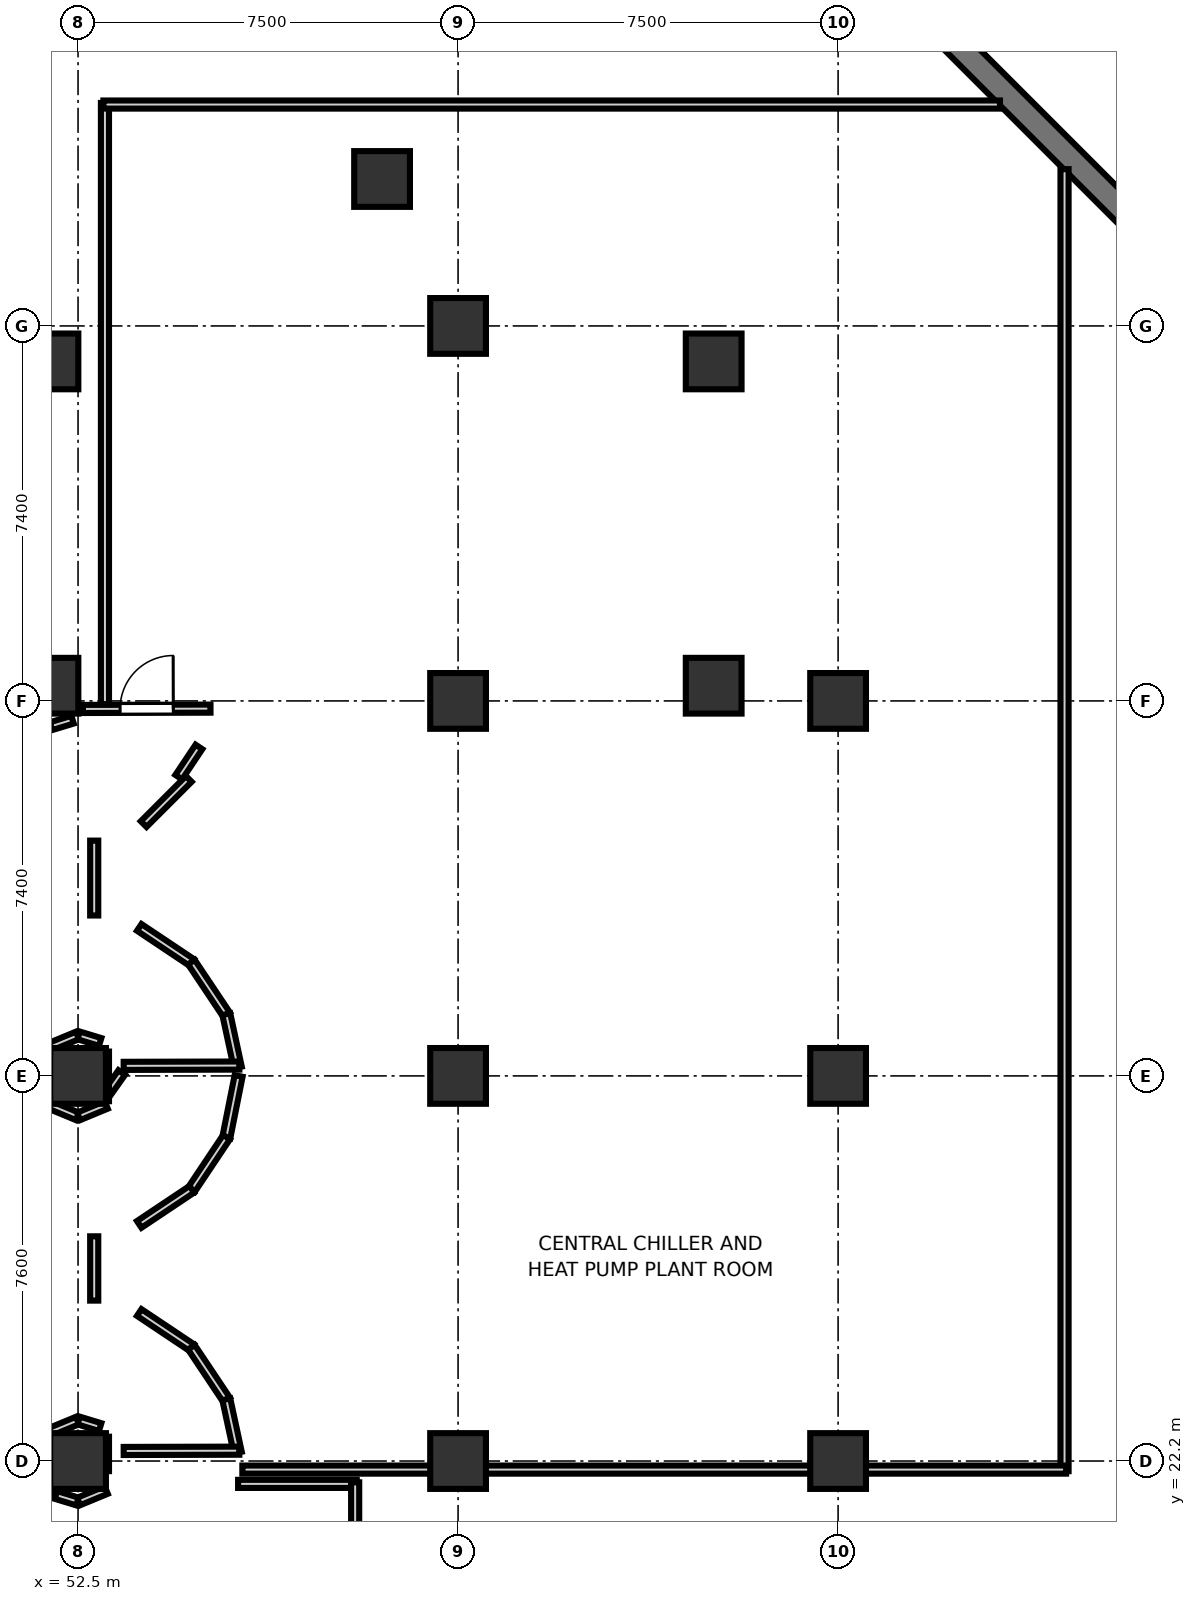
"""IFC4 building model, lengths in metres.
Left out: names, types, materials, properties, quantities, classifications, styles, units other than length and angle.
Written with IfcOpenShell. Run it as: python <this file> out.ifc"""

import sys

from ifc_helpers import new_model, si_unit, direction, frame, frame_2d, origin, origin_2d, place, context, subcontext, project, spatial, rectangle, extrude, element, fill, save


model = new_model("IFC4")
c1 = context("Model", 3, precision=1e-05, world=origin(), true_north=direction((0.0, 1.0)))
c2 = subcontext(c1, "Body", "Model", "MODEL_VIEW")
j1 = project(units=[si_unit("LENGTHUNIT", "METRE"), si_unit("PLANEANGLEUNIT", "RADIAN")], contexts=[c1])
p1 = place(None, origin())
s1 = spatial("IfcSite", under=j1, at=p1, CompositionType="ELEMENT")
p2 = place(p1, origin())
s2 = spatial("IfcBuilding", under=s1, at=p2, CompositionType="ELEMENT")
p3 = place(p2, frame((0.0, 0.0, -10.0)))
s3 = spatial("IfcBuildingStorey", under=s2, at=p3, CompositionType="ELEMENT", Elevation=-10.0)
for number, where, z_axis, x_axis in (
    (1, (51.955, 43.9, 0.0), (0.0, 0.0, 1.0), (1.0, 0.0, 0.0)),
    (2, (51.955, 37.5, 0.0), (0.0, 0.0, 1.0), (1.0, 0.0, 0.0)),
    (3, (65.045, 43.9, 0.0), (0.0, 0.0, 1.0), (1.0, 0.0, 0.0)),
    (4, (65.045, 37.5, 0.0), (0.0, 0.0, 1.0), (1.0, 0.0, 0.0)),
    (5, (52.5, 22.2, 0.0), (0.0, 0.0, 1.0), (1.0, 0.0, 0.0)),
    (6, (52.5, 29.8, 0.0), (0.0, 0.0, 1.0), (1.0, 0.0, 0.0)),
    (7, (60.0, 22.2, 0.0), (0.0, 0.0, 1.0), (1.0, 0.0, 0.0)),
    (8, (60.0, 29.8, 0.0), (0.0, 0.0, 1.0), (1.0, 0.0, 0.0)),
    (9, (60.0, 37.2, 0.0), (0.0, 0.0, 1.0), (1.0, 0.0, 0.0)),
    (10, (60.0, 44.6, 0.0), (0.0, 0.0, 1.0), (1.0, 0.0, 0.0)),
    (11, (67.5, 22.2, 0.0), (0.0, 0.0, 1.0), (1.0, 0.0, 0.0)),
    (12, (67.5, 29.8, 0.0), (0.0, 0.0, 1.0), (1.0, 0.0, 0.0)),
    (13, (67.5, 37.2, 0.0), (0.0, 0.0, 1.0), (1.0, 0.0, 0.0)),
    (14, (58.5, 47.5, 0.0), (0.0, 0.0, 1.0), (1.0, 0.0, 0.0)),
):
    element("IfcColumn", number, at=place(p3, frame(where, z_axis=z_axis, x_axis=x_axis)), inside=s3, PredefinedType="COLUMN", context=c2, shape_type="SweptSolid", body=[
        extrude(rectangle(XDim=1.1, YDim=1.1, at=origin_2d()), origin(), (0.0, 0.0, 1.0), 4.4),
    ])
p4 = place(p3, frame((73.5, 46.5, 0.0), z_axis=(0.0, 0.0, 1.0), x_axis=(-0.707106781187, 0.707106781187, 0.0)))
e15 = element("IfcWall", 15, at=p4, inside=s3, PredefinedType="SOLIDWALL", context=c2, shape_type="SweptSolid", body=[
    extrude(rectangle(XDim=5.657, YDim=0.5, at=frame_2d((2.828, 0.0))), origin(), (0.0, 0.0, 1.0), 4.0),
])
p5 = place(p3, frame((51.964, 36.7, 0.0), z_axis=(0.0, 0.0, 1.0), x_axis=(0.956858887343, 0.290553041134, 0.0)))
e16 = element("IfcWall", 16, at=p5, inside=s3, PredefinedType="PARTITIONING", context=c2, shape_type="SweptSolid", body=[
    extrude(rectangle(XDim=0.447, YDim=0.16, at=frame_2d((0.224, 0.0))), origin(), (0.0, 0.0, 1.0), 3.32),
])
p6 = place(p3, frame((52.596, 37.042, 0.0), z_axis=(0.0, 0.0, 1.0), x_axis=(0.999996822684, 0.002520837443, 0.0)))
e17 = element("IfcWall", 17, at=p6, inside=s3, PredefinedType="PARTITIONING", context=c2, shape_type="SweptSolid", body=[
    extrude(rectangle(XDim=2.518, YDim=0.16, at=frame_2d((1.259, 0.0))), origin(), (0.0, 0.0, 1.0), 3.32),
])
p7 = place(p6, frame((0.734, 0.0, 0.0)))
e18 = element("IfcOpeningElement", 18, at=p7, cuts=e17, PredefinedType="OPENING", context=c2, shape_type="SweptSolid", body=[
    extrude(rectangle(XDim=1.05, YDim=2.15, at=frame_2d((0.525, 1.075))), frame((0.0, 0.09, 0.0), z_axis=(0.0, -1.0, 0.0), x_axis=(1.0, 0.0, 0.0)), (0.0, 0.0, 1.0), 0.18),
])
p8 = place(p3, frame((54.886, 36.292, 0.0), z_axis=(0.0, 0.0, 1.0), x_axis=(-0.555719448407, -0.831369890399, 0.0)))
e19 = element("IfcWall", 19, at=p8, inside=s3, PredefinedType="PARTITIONING", context=c2, shape_type="SweptSolid", body=[
    extrude(rectangle(XDim=0.718, YDim=0.16, at=frame_2d((0.359, 0.0))), origin(), (0.0, 0.0, 1.0), 3.32),
])
p9 = place(p3, frame((52.819, 34.444, 0.0), z_axis=(0.0, 0.0, 1.0), x_axis=(0.0, -1.0, 0.0)))
e20 = element("IfcWall", 20, at=p9, inside=s3, PredefinedType="PARTITIONING", context=c2, shape_type="SweptSolid", body=[
    extrude(rectangle(XDim=1.478, YDim=0.16, at=frame_2d((0.739, 0.0))), origin(), (0.0, 0.0, 1.0), 3.32),
])
for number, where, z_axis, x_axis in (
    (21, (53.708, 32.731, 0.0), (0.0, 0.0, 1.0), (0.831, -0.556, 0.0)),
    (22, (54.737, 32.045, 0.0), (0.0, 0.0, 1.0), (0.556, -0.831, 0.0)),
):
    element("IfcWall", number, at=place(p3, frame(where, z_axis=z_axis, x_axis=x_axis)), inside=s3, PredefinedType="PARTITIONING", context=c2, shape_type="SweptSolid", body=[
        extrude(rectangle(XDim=1.249, YDim=0.16, at=frame_2d((0.624, 0.0))), origin(), (0.0, 0.0, 1.0), 3.32),
    ])
p10 = place(p3, frame((55.426, 31.018, 0.0), z_axis=(0.0, 0.0, 1.0), x_axis=(0.210629490676, -0.977565965885, 0.0)))
e23 = element("IfcWall", 23, at=p10, inside=s3, PredefinedType="PARTITIONING", context=c2, shape_type="SweptSolid", body=[
    extrude(rectangle(XDim=1.076, YDim=0.16, at=frame_2d((0.538, 0.0))), origin(), (0.0, 0.0, 1.0), 3.32),
])
p11 = place(p3, frame((55.683, 30.004, 0.0), z_axis=(0.0, 0.0, 1.0), x_axis=(-0.99999670426, -0.002567385634, 0.0)))
e24 = element("IfcWall", 24, at=p11, inside=s3, PredefinedType="PARTITIONING", context=c2, shape_type="SweptSolid", body=[
    extrude(rectangle(XDim=2.282, YDim=0.16, at=frame_2d((1.141, 0.0))), origin(), (0.0, 0.0, 1.0), 3.32),
])
p12 = place(p3, frame((52.937, 30.47, 0.0), z_axis=(0.0, 0.0, 1.0), x_axis=(-0.957010621041, 0.290052876583, 0.0)))
e25 = element("IfcWall", 25, at=p12, inside=s3, PredefinedType="PARTITIONING", context=c2, shape_type="SweptSolid", body=[
    extrude(rectangle(XDim=0.447, YDim=0.16, at=frame_2d((0.224, 0.0))), origin(), (0.0, 0.0, 1.0), 3.32),
])
p13 = place(p3, frame((52.488, 30.599, 0.0), z_axis=(0.0, 0.0, 1.0), x_axis=(-0.923835035561, -0.382790839847, 0.0)))
e26 = element("IfcWall", 26, at=p13, inside=s3, PredefinedType="PARTITIONING", context=c2, shape_type="SweptSolid", body=[
    extrude(rectangle(XDim=0.589, YDim=0.16, at=frame_2d((0.295, 0.0))), origin(), (0.0, 0.0, 1.0), 3.32),
])
p14 = place(p3, frame((51.927, 30.356, 0.0), z_axis=(0.0, 0.0, 1.0), x_axis=(-0.382937393786, -0.923774297348, 0.0)))
e27 = element("IfcWall", 27, at=p14, inside=s3, PredefinedType="PARTITIONING", context=c2, shape_type="SweptSolid", body=[
    extrude(rectangle(XDim=0.589, YDim=0.16, at=frame_2d((0.294, 0.0))), origin(), (0.0, 0.0, 1.0), 3.32),
])
p15 = place(p3, frame((51.701, 29.788, 0.0), z_axis=(0.0, 0.0, 1.0), x_axis=(0.382790839847, -0.923835035561, 0.0)))
e28 = element("IfcWall", 28, at=p15, inside=s3, PredefinedType="PARTITIONING", context=c2, shape_type="SweptSolid", body=[
    extrude(rectangle(XDim=0.589, YDim=0.16, at=frame_2d((0.295, 0.0))), origin(), (0.0, 0.0, 1.0), 3.32),
])
for number, where, z_axis, x_axis in (
    (29, (51.944, 29.227, 0.0), (0.0, 0.0, 1.0), (0.924, -0.382, 0.0)),
    (30, (52.512, 29.001, 0.0), (0.0, 0.0, 1.0), (0.924, 0.382, 0.0)),
):
    element("IfcWall", number, at=place(p3, frame(where, z_axis=z_axis, x_axis=x_axis)), inside=s3, PredefinedType="PARTITIONING", context=c2, shape_type="SweptSolid", body=[
        extrude(rectangle(XDim=0.589, YDim=0.16, at=frame_2d((0.294, 0.0))), origin(), (0.0, 0.0, 1.0), 3.32),
    ])
p16 = place(p3, frame((55.669, 29.799, 0.0), z_axis=(0.0, 0.0, 1.0), x_axis=(-0.195624591427, -0.980678856318, 0.0)))
e31 = element("IfcWall", 31, at=p16, inside=s3, PredefinedType="PARTITIONING", context=c2, shape_type="SweptSolid", body=[
    extrude(rectangle(XDim=1.242, YDim=0.16, at=frame_2d((0.621, 0.0))), origin(), (0.0, 0.0, 1.0), 3.32),
])
for number, where, z_axis, x_axis in (
    (32, (55.431, 28.593, 0.0), (0.0, 0.0, 1.0), (-0.556, -0.831, 0.0)),
    (33, (54.746, 27.563, 0.0), (0.0, 0.0, 1.0), (-0.831, -0.556, 0.0)),
):
    element("IfcWall", number, at=place(p3, frame(where, z_axis=z_axis, x_axis=x_axis)), inside=s3, PredefinedType="PARTITIONING", context=c2, shape_type="SweptSolid", body=[
        extrude(rectangle(XDim=1.249, YDim=0.16, at=frame_2d((0.624, 0.0))), origin(), (0.0, 0.0, 1.0), 3.32),
    ])
p17 = place(p3, frame((52.819, 26.635, 0.0), z_axis=(0.0, 0.0, 1.0), x_axis=(0.0, -1.0, 0.0)))
e34 = element("IfcWall", 34, at=p17, inside=s3, PredefinedType="PARTITIONING", context=c2, shape_type="SweptSolid", body=[
    extrude(rectangle(XDim=1.269, YDim=0.16, at=frame_2d((0.635, 0.0))), origin(), (0.0, 0.0, 1.0), 3.32),
])
for number, where, z_axis, x_axis in (
    (35, (53.708, 25.131, 0.0), (0.0, 0.0, 1.0), (0.831, -0.556, 0.0)),
    (36, (54.737, 24.446, 0.0), (0.0, 0.0, 1.0), (0.556, -0.831, 0.0)),
):
    element("IfcWall", number, at=place(p3, frame(where, z_axis=z_axis, x_axis=x_axis)), inside=s3, PredefinedType="PARTITIONING", context=c2, shape_type="SweptSolid", body=[
        extrude(rectangle(XDim=1.249, YDim=0.16, at=frame_2d((0.624, 0.0))), origin(), (0.0, 0.0, 1.0), 3.32),
    ])
p18 = place(p3, frame((55.426, 23.418, 0.0), z_axis=(0.0, 0.0, 1.0), x_axis=(0.210582766426, -0.977576032073, 0.0)))
e37 = element("IfcWall", 37, at=p18, inside=s3, PredefinedType="PARTITIONING", context=c2, shape_type="SweptSolid", body=[
    extrude(rectangle(XDim=1.076, YDim=0.16, at=frame_2d((0.538, 0.0))), origin(), (0.0, 0.0, 1.0), 3.32),
])
p19 = place(p3, frame((55.683, 22.404, 0.0), z_axis=(0.0, 0.0, 1.0), x_axis=(-0.999996973182, -0.002460411894, 0.0)))
e38 = element("IfcWall", 38, at=p19, inside=s3, PredefinedType="PARTITIONING", context=c2, shape_type="SweptSolid", body=[
    extrude(rectangle(XDim=2.282, YDim=0.16, at=frame_2d((1.141, 0.0))), origin(), (0.0, 0.0, 1.0), 3.32),
])
p20 = place(p3, frame((52.937, 22.87, 0.0), z_axis=(0.0, 0.0, 1.0), x_axis=(-0.956858887343, 0.290553041134, 0.0)))
e39 = element("IfcWall", 39, at=p20, inside=s3, PredefinedType="PARTITIONING", context=c2, shape_type="SweptSolid", body=[
    extrude(rectangle(XDim=0.447, YDim=0.16, at=frame_2d((0.224, 0.0))), origin(), (0.0, 0.0, 1.0), 3.32),
])
p21 = place(p3, frame((52.488, 22.999, 0.0), z_axis=(0.0, 0.0, 1.0), x_axis=(-0.923981493772, -0.382437183296, 0.0)))
e40 = element("IfcWall", 40, at=p21, inside=s3, PredefinedType="PARTITIONING", context=c2, shape_type="SweptSolid", body=[
    extrude(rectangle(XDim=0.589, YDim=0.16, at=frame_2d((0.294, 0.0))), origin(), (0.0, 0.0, 1.0), 3.32),
])
p22 = place(p3, frame((51.719, 22.033, 0.0), z_axis=(0.0, 0.0, 1.0), x_axis=(0.555369021078, -0.831604022613, 0.0)))
e41 = element("IfcWall", 41, at=p22, inside=s3, PredefinedType="PARTITIONING", context=c2, shape_type="SweptSolid", body=[
    extrude(rectangle(XDim=0.59, YDim=0.16, at=frame_2d((0.295, 0.0))), origin(), (0.0, 0.0, 1.0), 3.32),
])
p23 = place(p3, frame((52.063, 21.53, 0.0), z_axis=(0.0, 0.0, 1.0), x_axis=(0.957010621041, -0.290052876583, 0.0)))
e42 = element("IfcWall", 42, at=p23, inside=s3, PredefinedType="PARTITIONING", context=c2, shape_type="SweptSolid", body=[
    extrude(rectangle(XDim=0.447, YDim=0.16, at=frame_2d((0.224, 0.0))), origin(), (0.0, 0.0, 1.0), 3.32),
])
p24 = place(p3, frame((52.512, 21.401, 0.0), z_axis=(0.0, 0.0, 1.0), x_axis=(0.923835035561, 0.382790839847, 0.0)))
e43 = element("IfcWall", 43, at=p24, inside=s3, PredefinedType="PARTITIONING", context=c2, shape_type="SweptSolid", body=[
    extrude(rectangle(XDim=0.589, YDim=0.16, at=frame_2d((0.295, 0.0))), origin(), (0.0, 0.0, 1.0), 3.32),
])
p25 = place(p3, frame((55.659, 21.749, 0.0), z_axis=(0.0, 0.0, 1.0), x_axis=(1.0, 0.0, 0.0)))
e44 = element("IfcWall", 44, at=p25, inside=s3, PredefinedType="PARTITIONING", context=c2, shape_type="SweptSolid", body=[
    extrude(rectangle(XDim=2.341, YDim=0.16, at=frame_2d((1.171, 0.0))), origin(), (0.0, 0.0, 1.0), 3.32),
])
p26 = place(p3, frame((57.969, 21.78, 0.0), z_axis=(0.0, 0.0, 1.0), x_axis=(0.0, -1.0, 0.0)))
e45 = element("IfcWall", 45, at=p26, inside=s3, PredefinedType="PARTITIONING", context=c2, shape_type="SweptSolid", body=[
    extrude(rectangle(XDim=3.23, YDim=0.16, at=frame_2d((1.615, 0.0))), origin(), (0.0, 0.0, 1.0), 3.32),
])
p27 = place(p3, frame((53.362, 29.866, 0.0), z_axis=(0.0, 0.0, 1.0), x_axis=(-0.577825504344, -0.816160331387, 0.0)))
e46 = element("IfcWall", 46, at=p27, inside=s3, PredefinedType="PARTITIONING", context=c2, shape_type="SweptSolid", body=[
    extrude(rectangle(XDim=0.671, YDim=0.16, at=frame_2d((0.335, 0.0))), origin(), (0.0, 0.0, 1.0), 3.32),
])
p28 = place(p3, frame((53.031, 29.301, 0.0), z_axis=(0.0, 0.0, 1.0), x_axis=(0.0, 1.0, 0.0)))
e47 = element("IfcWall", 47, at=p28, inside=s3, PredefinedType="PARTITIONING", context=c2, shape_type="SweptSolid", body=[
    extrude(rectangle(XDim=0.98, YDim=0.16, at=frame_2d((0.49, 0.0))), origin(), (0.0, 0.0, 1.0), 3.32),
])
p29 = place(p3, frame((53.794, 34.77, 0.0), z_axis=(0.0, 0.0, 1.0), x_axis=(0.707106781187, 0.707106781187, 0.0)))
e48 = element("IfcWall", 48, at=p29, inside=s3, PredefinedType="PARTITIONING", context=c2, shape_type="SweptSolid", body=[
    extrude(rectangle(XDim=1.26, YDim=0.16, at=frame_2d((0.63, 0.0))), origin(), (0.0, 0.0, 1.0), 3.32),
])
p30 = place(p3, frame((53.031, 37.135, 0.0), z_axis=(0.0, 0.0, 1.0), x_axis=(0.0, 1.0, 0.0)))
e49 = element("IfcWall", 49, at=p30, inside=s3, PredefinedType="PARTITIONING", context=c2, shape_type="SweptSolid", body=[
    extrude(rectangle(XDim=11.865, YDim=0.16, at=frame_2d((5.932, 0.0))), origin(), (0.0, 0.0, 1.0), 3.32),
])
p31 = place(p3, frame((53.0, 48.969, 0.0), z_axis=(0.0, 0.0, 1.0), x_axis=(1.0, 0.0, 0.0)))
e50 = element("IfcWall", 50, at=p31, inside=s3, PredefinedType="PARTITIONING", context=c2, shape_type="SweptSolid", body=[
    extrude(rectangle(XDim=17.694, YDim=0.16, at=frame_2d((8.847, 0.0))), origin(), (0.0, 0.0, 1.0), 3.32),
])
p32 = place(p3, frame((71.969, 47.694, 0.0), z_axis=(0.0, 0.0, 1.0), x_axis=(0.0, -1.0, 0.0)))
e51 = element("IfcWall", 51, at=p32, inside=s3, PredefinedType="PARTITIONING", context=c2, shape_type="SweptSolid", body=[
    extrude(rectangle(XDim=25.694, YDim=0.16, at=frame_2d((12.847, 0.0))), origin(), (0.0, 0.0, 1.0), 3.32),
])
p33 = place(p3, frame((72.0, 22.031, 0.0), z_axis=(0.0, 0.0, 1.0), x_axis=(-1.0, 0.0, 0.0)))
e52 = element("IfcWall", 52, at=p33, inside=s3, PredefinedType="PARTITIONING", context=c2, shape_type="SweptSolid", body=[
    extrude(rectangle(XDim=16.257, YDim=0.16, at=frame_2d((8.129, 0.0))), origin(), (0.0, 0.0, 1.0), 3.32),
])
p34 = place(p3, frame((53.031, 22.0, 0.0), z_axis=(0.0, 0.0, 1.0), x_axis=(0.0, 1.0, 0.0)))
e53 = element("IfcWall", 53, at=p34, inside=s3, PredefinedType="PARTITIONING", context=c2, shape_type="SweptSolid", body=[
    extrude(rectangle(XDim=0.68, YDim=0.16, at=frame_2d((0.34, 0.0))), origin(), (0.0, 0.0, 1.0), 3.32),
])
p35 = place(p7, origin())
e54 = element("IfcDoor", 54, at=p35, inside=s3, OperationType="SINGLE_SWING_RIGHT", PredefinedType="DOOR", context=c2, shape_type="SweptSolid", body=[
    extrude(rectangle(XDim=1.05, YDim=2.15, at=frame_2d((0.525, 1.075))), frame((0.0, 0.025, 0.0), z_axis=(0.0, -1.0, 0.0), x_axis=(1.0, 0.0, 0.0)), (0.0, 0.0, 1.0), 0.05),
])
fill(e18, e54)
save(model, sys.argv[1])
